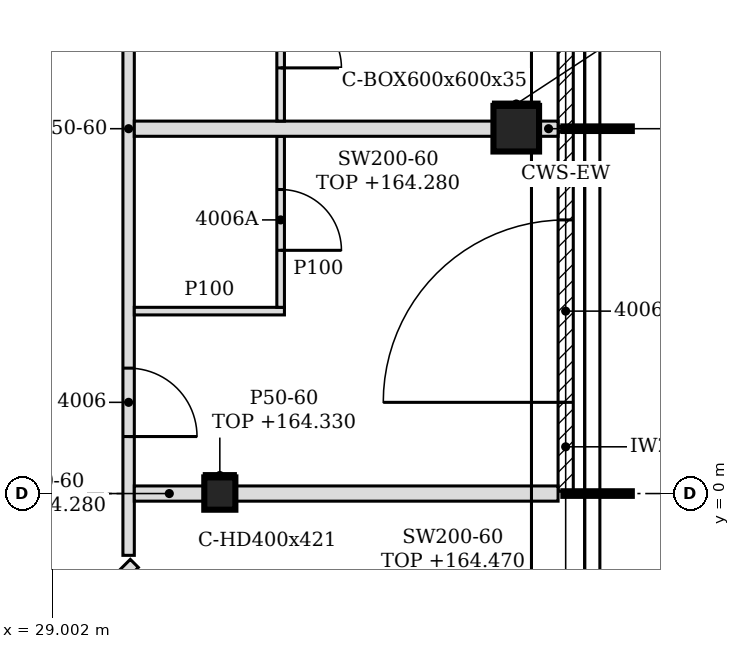
"""IFC4 building model, lengths in metres.
Left out: names, types, materials, properties, quantities, classifications, styles, units other than length and angle.
Written with IfcOpenShell. Run it as: python <this file> out.ifc"""

import sys

from ifc_helpers import new_model, si_unit, direction, frame, frame_2d, origin, origin_2d, place, context, subcontext, project, spatial, polyline, rectangle, hollow_rectangle, i_section, outline, extrude, element, fill, save


model = new_model("IFC4")
c1 = context("Model", 3, precision=1e-05, world=origin(), true_north=direction((0.0, 1.0)))
c2 = subcontext(c1, "Body", "Model", "MODEL_VIEW")
j1 = project(units=[si_unit("LENGTHUNIT", "METRE"), si_unit("PLANEANGLEUNIT", "RADIAN")], contexts=[c1])
p1 = place(None, origin())
s1 = spatial("IfcSite", under=j1, at=p1, CompositionType="ELEMENT")
p2 = place(p1, origin())
s2 = spatial("IfcBuilding", under=s1, at=p2, CompositionType="ELEMENT")
p3 = place(p2, frame((0.0, 0.0, 161.4)))
s3 = spatial("IfcBuildingStorey", under=s2, at=p3, CompositionType="ELEMENT", Elevation=161.4)
p4 = place(p3, frame((35.1, 4.8, -0.15), z_axis=(0.0, 0.0, 1.0), x_axis=(1.0, 0.0, 0.0)))
e1 = element("IfcColumn", 1, at=p4, inside=s3, PredefinedType="COLUMN", context=c2, shape_type="SweptSolid", body=[
    extrude(hollow_rectangle(XDim=0.6, YDim=0.6, WallThickness=0.035, at=origin_2d()), origin(), (0.0, 0.0, 1.0), 3.6),
])
p5 = place(p3, frame((31.2, 0.0, -0.15), z_axis=(0.0, 0.0, 1.0), x_axis=(1.0, 0.0, 0.0)))
e2 = element("IfcColumn", 2, at=p5, inside=s3, PredefinedType="COLUMN", context=c2, shape_type="SweptSolid", body=[
    extrude(i_section(OverallWidth=0.409, OverallDepth=0.425, WebThickness=0.033, FlangeThickness=0.052, FilletRadius=0.015, at=origin_2d()), origin(), (0.0, 0.0, 1.0), 3.6),
])
p6 = place(p3, frame((35.75, 0.03, 0.0), z_axis=(0.0, 0.0, 1.0), x_axis=(0.0, 1.0, 0.0)))
e3 = element("IfcWall", 3, at=p6, inside=s3, PredefinedType="NOTDEFINED", context=c2, shape_type="SweptSolid", body=[
    extrude(rectangle(XDim=4.74, YDim=0.2, at=frame_2d((2.37, 0.0))), origin(), (0.0, 0.0, 1.0), 3.45),
])
p7 = place(p6, frame((1.17, 0.0, 0.0)))
e4 = element("IfcOpeningElement", 4, at=p7, cuts=e3, PredefinedType="OPENING", context=c2, shape_type="SweptSolid", body=[
    extrude(rectangle(XDim=2.4, YDim=2.4, at=frame_2d((1.2, 1.2))), frame((0.0, 0.11, 0.0), z_axis=(0.0, -1.0, 0.0), x_axis=(1.0, 0.0, 0.0)), (0.0, 0.0, 1.0), 0.22),
])
p8 = place(p3, frame((35.75, 4.83, 0.0), z_axis=(0.0, 0.0, 1.0), x_axis=(0.0, 1.0, 0.0)))
e5 = element("IfcWall", 5, at=p8, inside=s3, PredefinedType="NOTDEFINED", context=c2, shape_type="SweptSolid", body=[
    extrude(rectangle(XDim=4.74, YDim=0.2, at=frame_2d((2.37, 0.0))), origin(), (0.0, 0.0, 1.0), 3.45),
])
p9 = place(p8, frame((1.17, 0.0, 0.0)))
e6 = element("IfcOpeningElement", 6, at=p9, cuts=e5, PredefinedType="OPENING", context=c2, shape_type="SweptSolid", body=[
    extrude(rectangle(XDim=2.4, YDim=2.4, at=frame_2d((1.2, 1.2))), frame((0.0, 0.11, 0.0), z_axis=(0.0, -1.0, 0.0), x_axis=(1.0, 0.0, 0.0)), (0.0, 0.0, 1.0), 0.22),
])
p10 = place(p3, frame((22.722, -8.272, 0.0), z_axis=(0.0, 0.0, 1.0), x_axis=(0.707106781187, 0.707106781187, 0.0)))
e7 = element("IfcWall", 7, at=p10, inside=s3, PredefinedType="PARTITIONING", context=c2, shape_type="SweptSolid", body=[
    extrude(rectangle(XDim=10.399, YDim=0.15, at=frame_2d((5.199, 0.0))), origin(), (0.0, 0.0, 1.0), 2.88),
])
p11 = place(p10, frame((2.846, 0.0, 0.0)))
e8 = element("IfcOpeningElement", 8, at=p11, cuts=e7, PredefinedType="OPENING", context=c2, shape_type="SweptSolid", body=[
    extrude(rectangle(XDim=0.9, YDim=2.1, at=frame_2d((0.45, 1.05))), frame((0.0, 0.085, 0.0), z_axis=(0.0, -1.0, 0.0), x_axis=(1.0, 0.0, 0.0)), (0.0, 0.0, 1.0), 0.17),
])
p12 = place(p10, frame((6.116, 0.0, 0.0)))
e9 = element("IfcOpeningElement", 9, at=p12, cuts=e7, PredefinedType="OPENING", context=c2, shape_type="SweptSolid", body=[
    extrude(rectangle(XDim=0.9, YDim=2.1, at=frame_2d((0.45, 1.05))), frame((0.0, 0.085, 0.0), z_axis=(0.0, -1.0, 0.0), x_axis=(1.0, 0.0, 0.0)), (0.0, 0.0, 1.0), 0.17),
])
p13 = place(p3, frame((30.0, -0.813, 0.0), z_axis=(0.0, 0.0, 1.0), x_axis=(0.0, 1.0, 0.0)))
e10 = element("IfcWall", 10, at=p13, inside=s3, PredefinedType="PARTITIONING", context=c2, shape_type="SweptSolid", body=[
    extrude(outline(polyline([(0.0, 0.0), (12.834, 0.0), (12.834, 3.45), (10.518, 3.45), (10.516, 2.88), (10.308, 2.88), (10.306, 3.45), (5.718, 3.45), (5.716, 2.88), (5.508, 2.88), (5.506, 3.45), (0.918, 3.45), (0.916, 2.88), (0.708, 2.88), (0.706, 3.45), (0.0, 3.45), (0.0, 0.0)])), frame((0.0, 0.075, 0.0), z_axis=(0.0, -1.0, 0.0), x_axis=(1.0, 0.0, 0.0)), (0.0, 0.0, 1.0), 0.15),
])
p14 = place(p13, frame((1.563, 0.0, 0.0)))
e11 = element("IfcOpeningElement", 11, at=p14, cuts=e10, PredefinedType="OPENING", context=c2, shape_type="SweptSolid", body=[
    extrude(rectangle(XDim=0.9, YDim=2.1, at=frame_2d((0.45, 1.05))), frame((0.0, 0.085, 0.0), z_axis=(0.0, -1.0, 0.0), x_axis=(1.0, 0.0, 0.0)), (0.0, 0.0, 1.0), 0.17),
])
p15 = place(p13, frame((8.763, 0.0, 0.0)))
e12 = element("IfcOpeningElement", 12, at=p15, cuts=e10, PredefinedType="OPENING", context=c2, shape_type="SweptSolid", body=[
    extrude(rectangle(XDim=0.9, YDim=2.1, at=frame_2d((0.45, 1.05))), frame((0.0, 0.085, 0.0), z_axis=(0.0, -1.0, 0.0), x_axis=(1.0, 0.0, 0.0)), (0.0, 0.0, 1.0), 0.17),
])
p16 = place(p13, frame((11.121, 0.0, 0.0)))
e13 = element("IfcOpeningElement", 13, at=p16, cuts=e10, PredefinedType="OPENING", context=c2, shape_type="SweptSolid", body=[
    extrude(rectangle(XDim=0.9, YDim=2.1, at=frame_2d((0.45, 1.05))), frame((0.0, 0.085, 0.0), z_axis=(0.0, -1.0, 0.0), x_axis=(1.0, 0.0, 0.0)), (0.0, 0.0, 1.0), 0.17),
])
p17 = place(p3, frame((30.075, 0.0, 0.0), z_axis=(0.0, 0.0, 1.0), x_axis=(1.0, 0.0, 0.0)))
e14 = element("IfcWall", 14, at=p17, inside=s3, PredefinedType="PARTITIONING", context=c2, shape_type="SweptSolid", body=[
    extrude(rectangle(XDim=0.921, YDim=0.2, at=frame_2d((0.46, 0.0))), origin(), (0.0, 0.0, 1.0), 2.88),
])
p18 = place(p3, frame((31.405, 0.0, 0.0), z_axis=(0.0, 0.0, 1.0), x_axis=(1.0, 0.0, 0.0)))
e15 = element("IfcWall", 15, at=p18, inside=s3, PredefinedType="PARTITIONING", context=c2, shape_type="SweptSolid", body=[
    extrude(outline(polyline([(0.0, 0.0), (4.245, 0.0), (4.246, 3.07), (3.845, 3.07), (3.844, 2.93), (3.545, 2.93), (3.543, 3.07), (0.0, 3.07), (0.0, 0.0)])), frame((0.0, 0.1, 0.0), z_axis=(0.0, -1.0, 0.0), x_axis=(1.0, 0.0, 0.0)), (0.0, 0.0, 1.0), 0.2),
])
p19 = place(p3, frame((30.075, 2.4, 0.0), z_axis=(0.0, 0.0, 1.0), x_axis=(1.0, 0.0, 0.0)))
e16 = element("IfcWall", 16, at=p19, inside=s3, PredefinedType="PARTITIONING", context=c2, shape_type="SweptSolid", body=[
    extrude(outline(polyline([(0.0, 0.0), (1.975, 0.0), (1.975, 3.45), (1.275, 3.45), (1.273, 2.93), (0.975, 2.93), (0.973, 3.45), (0.0, 3.45), (0.0, 0.0)])), frame((0.0, 0.05, 0.0), z_axis=(0.0, -1.0, 0.0), x_axis=(1.0, 0.0, 0.0)), (0.0, 0.0, 1.0), 0.1),
])
p20 = place(p3, frame((32.0, 2.45, 0.0), z_axis=(0.0, 0.0, 1.0), x_axis=(0.0, 1.0, 0.0)))
e17 = element("IfcWall", 17, at=p20, inside=s3, PredefinedType="PARTITIONING", context=c2, shape_type="SweptSolid", body=[
    extrude(rectangle(XDim=2.25, YDim=0.1, at=frame_2d((1.125, 0.0))), origin(), (0.0, 0.0, 1.0), 3.45),
])
p21 = place(p20, frame((0.75, 0.0, 0.0)))
e18 = element("IfcOpeningElement", 18, at=p21, cuts=e17, PredefinedType="OPENING", context=c2, shape_type="SweptSolid", body=[
    extrude(rectangle(XDim=0.8, YDim=2.1, at=frame_2d((0.4, 1.05))), frame((0.0, 0.06, 0.0), z_axis=(0.0, -1.0, 0.0), x_axis=(1.0, 0.0, 0.0)), (0.0, 0.0, 1.0), 0.12),
])
p22 = place(p3, frame((30.075, 4.8, 0.0), z_axis=(0.0, 0.0, 1.0), x_axis=(1.0, 0.0, 0.0)))
e19 = element("IfcWall", 19, at=p22, inside=s3, PredefinedType="PARTITIONING", context=c2, shape_type="SweptSolid", body=[
    extrude(rectangle(XDim=4.725, YDim=0.2, at=frame_2d((2.363, 0.0))), origin(), (0.0, 0.0, 1.0), 2.88),
])
p23 = place(p3, frame((35.4, 4.8, 0.0), z_axis=(0.0, 0.0, 1.0), x_axis=(1.0, 0.0, 0.0)))
e20 = element("IfcWall", 20, at=p23, inside=s3, PredefinedType="PARTITIONING", context=c2, shape_type="SweptSolid", body=[
    extrude(rectangle(XDim=0.25, YDim=0.2, at=frame_2d((0.125, 0.0))), origin(), (0.0, 0.0, 1.0), 3.45),
])
p24 = place(p3, frame((32.0, 4.9, 0.0), z_axis=(0.0, 0.0, 1.0), x_axis=(0.0, 1.0, 0.0)))
e21 = element("IfcWall", 21, at=p24, inside=s3, PredefinedType="PARTITIONING", context=c2, shape_type="SweptSolid", body=[
    extrude(rectangle(XDim=2.25, YDim=0.1, at=frame_2d((1.125, 0.0))), origin(), (0.0, 0.0, 1.0), 3.45),
])
p25 = place(p24, frame((0.7, 0.0, 0.0)))
e22 = element("IfcOpeningElement", 22, at=p25, cuts=e21, PredefinedType="OPENING", context=c2, shape_type="SweptSolid", body=[
    extrude(rectangle(XDim=0.8, YDim=2.1, at=frame_2d((0.4, 1.05))), frame((0.0, 0.06, 0.0), z_axis=(0.0, -1.0, 0.0), x_axis=(1.0, 0.0, 0.0)), (0.0, 0.0, 1.0), 0.12),
])
p26 = place(p3, frame((30.996, 0.238, 0.0), z_axis=(0.0, 0.0, 1.0), x_axis=(1.0, 0.0, 0.0)))
e23 = element("IfcWall", 23, at=p26, inside=s3, PredefinedType="PARTITIONING", context=c2, shape_type="SweptSolid", body=[
    extrude(rectangle(XDim=0.409, YDim=0.05, at=frame_2d((0.205, 0.0))), origin(), (0.0, 0.0, 1.0), 2.93),
])
p27 = place(p3, frame((34.8, 5.125, 0.0), z_axis=(0.0, 0.0, 1.0), x_axis=(1.0, 0.0, 0.0)))
e24 = element("IfcWall", 24, at=p27, inside=s3, PredefinedType="PARTITIONING", context=c2, shape_type="SweptSolid", body=[
    extrude(rectangle(XDim=0.6, YDim=0.05, at=frame_2d((0.3, 0.0))), origin(), (0.0, 0.0, 1.0), 2.93),
])
p28 = place(p7, origin())
e25 = element("IfcDoor", 25, at=p28, inside=s3, OperationType="SINGLE_SWING_LEFT", PredefinedType="DOOR", context=c2, shape_type="SweptSolid", body=[
    extrude(rectangle(XDim=2.4, YDim=2.4, at=frame_2d((1.2, 1.2))), frame((0.0, 0.025, 0.0), z_axis=(0.0, -1.0, 0.0), x_axis=(1.0, 0.0, 0.0)), (0.0, 0.0, 1.0), 0.05),
])
fill(e4, e25)
p29 = place(p14, frame((0.9, 0.0, 0.0), z_axis=(0.0, 0.0, 1.0), x_axis=(-1.0, 0.0, 0.0)))
e26 = element("IfcDoor", 26, at=p29, inside=s3, OperationType="SINGLE_SWING_RIGHT", PredefinedType="DOOR", context=c2, shape_type="SweptSolid", body=[
    extrude(rectangle(XDim=0.9, YDim=2.1, at=frame_2d((0.45, 1.05))), frame((0.0, 0.025, 0.0), z_axis=(0.0, -1.0, 0.0), x_axis=(1.0, 0.0, 0.0)), (0.0, 0.0, 1.0), 0.05),
])
fill(e11, e26)
p30 = place(p21, frame((0.8, 0.0, 0.0), z_axis=(0.0, 0.0, 1.0), x_axis=(-1.0, 0.0, 0.0)))
e27 = element("IfcDoor", 27, at=p30, inside=s3, OperationType="SINGLE_SWING_RIGHT", PredefinedType="DOOR", context=c2, shape_type="SweptSolid", body=[
    extrude(rectangle(XDim=0.8, YDim=2.1, at=frame_2d((0.4, 1.05))), frame((0.0, 0.025, 0.0), z_axis=(0.0, -1.0, 0.0), x_axis=(1.0, 0.0, 0.0)), (0.0, 0.0, 1.0), 0.05),
])
fill(e18, e27)
p31 = place(p25, frame((0.8, 0.0, 0.0), z_axis=(0.0, 0.0, 1.0), x_axis=(-1.0, 0.0, 0.0)))
e28 = element("IfcDoor", 28, at=p31, inside=s3, OperationType="SINGLE_SWING_RIGHT", PredefinedType="DOOR", context=c2, shape_type="SweptSolid", body=[
    extrude(rectangle(XDim=0.8, YDim=2.1, at=frame_2d((0.4, 1.05))), frame((0.0, 0.025, 0.0), z_axis=(0.0, -1.0, 0.0), x_axis=(1.0, 0.0, 0.0)), (0.0, 0.0, 1.0), 0.05),
])
fill(e22, e28)
save(model, sys.argv[1])
